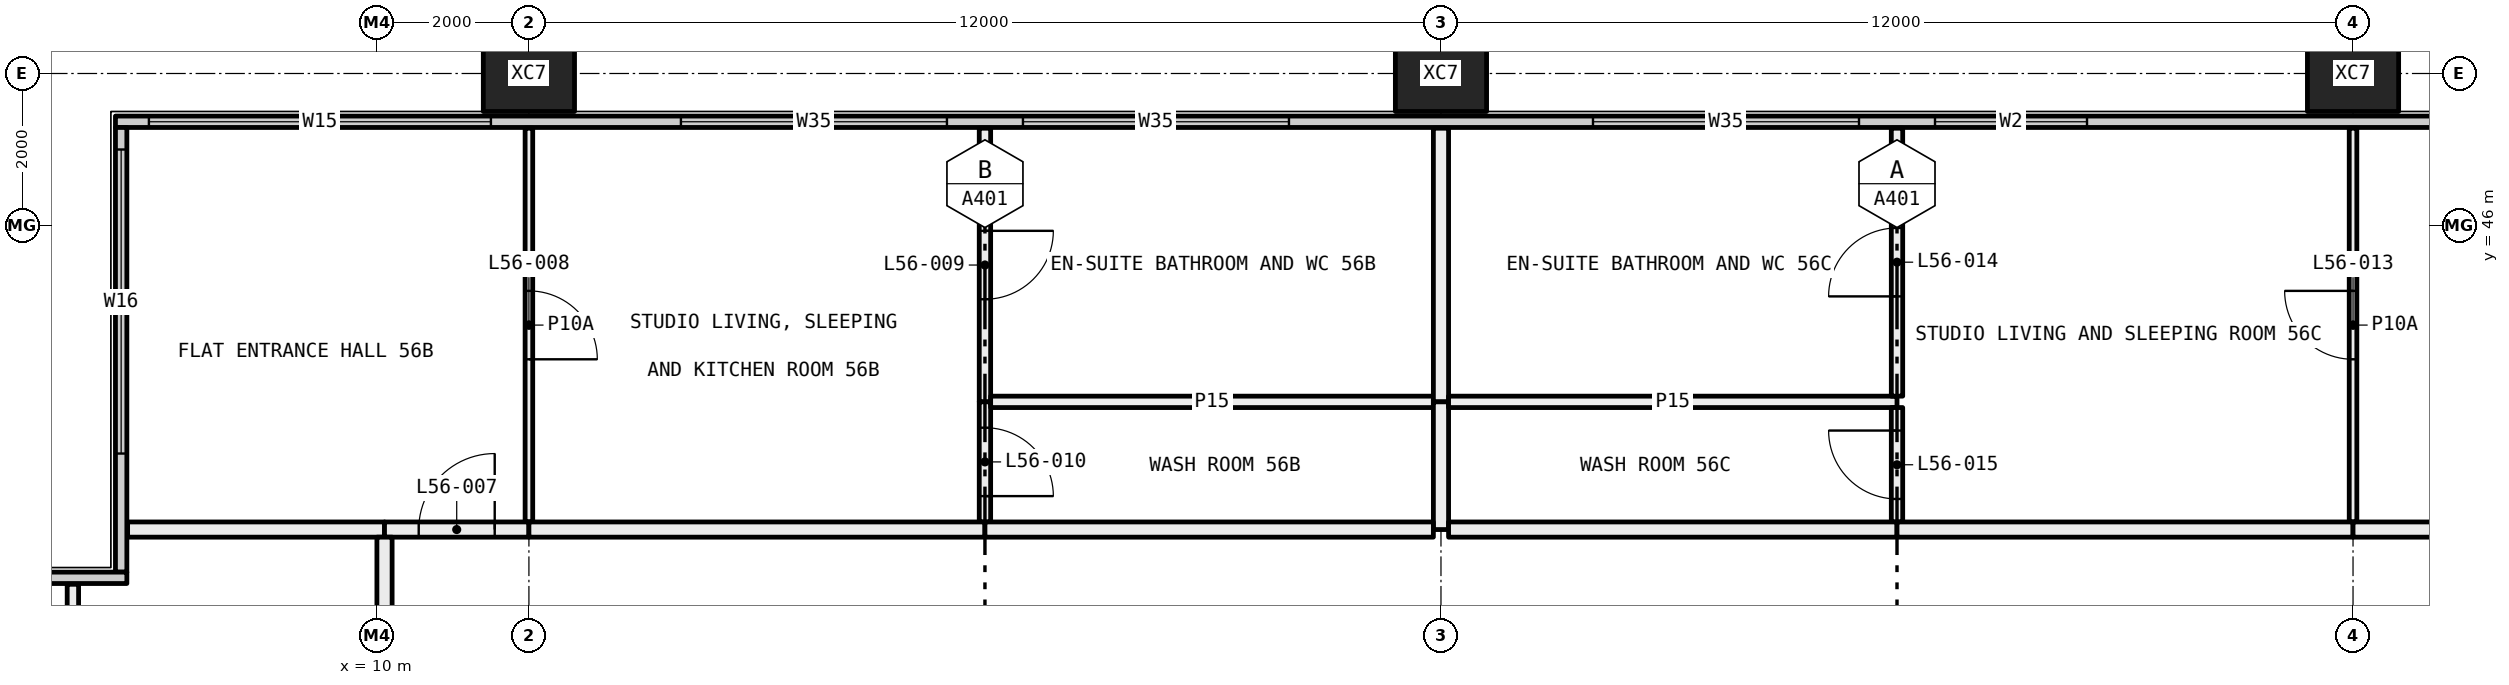
"""IFC4 building model, lengths in metres.
Left out: names, types, materials, properties, quantities, classifications, styles, units other than length and angle.
Written with IfcOpenShell. Run it as: python <this file> out.ifc"""

import sys

from ifc_helpers import new_model, si_unit, direction, frame, frame_2d, origin, origin_2d, place, context, subcontext, project, spatial, rectangle, hollow_rectangle, extrude, element, fill, save


model = new_model("IFC4")
c1 = context("Model", 3, precision=1e-05, world=origin(), true_north=direction((0.0, 1.0)))
c2 = subcontext(c1, "Body", "Model", "MODEL_VIEW")
j1 = project(units=[si_unit("LENGTHUNIT", "METRE"), si_unit("PLANEANGLEUNIT", "RADIAN")], contexts=[c1])
p1 = place(None, origin())
s1 = spatial("IfcSite", under=j1, at=p1, CompositionType="ELEMENT")
p2 = place(p1, origin())
s2 = spatial("IfcBuilding", under=s1, at=p2, CompositionType="ELEMENT")
p3 = place(p2, frame((0.0, 0.0, 210.0)))
s3 = spatial("IfcBuildingStorey", under=s2, at=p3, CompositionType="ELEMENT", Elevation=210.0)
for number, where, z_axis, x_axis in (
    (1, (12.0, 48.0, -0.4), (0.0, 0.0, 1.0), (1.0, 0.0, 0.0)),
    (2, (24.0, 48.0, -0.4), (0.0, 0.0, 1.0), (1.0, 0.0, 0.0)),
    (3, (36.0, 48.0, -0.4), (0.0, 0.0, 1.0), (1.0, 0.0, 0.0)),
):
    element("IfcColumn", number, at=place(p3, frame(where, z_axis=z_axis, x_axis=x_axis)), inside=s3, PredefinedType="COLUMN", context=c2, shape_type="SweptSolid", body=[
        extrude(hollow_rectangle(XDim=1.2, YDim=1.0, WallThickness=0.045, at=origin_2d()), origin(), (0.0, 0.0, 1.0), 3.45),
    ])
p4 = place(p3, frame((6.56, 47.365, 0.0), z_axis=(0.0, 0.0, 1.0), x_axis=(1.0, 0.0, 0.0)))
e4 = element("IfcWall", 4, at=p4, inside=s3, PredefinedType="ELEMENTEDWALL", context=c2, shape_type="SweptSolid", body=[
    extrude(rectangle(XDim=46.88, YDim=0.15, at=frame_2d((23.44, 0.0))), origin(), (0.0, 0.0, 1.0), 3.05),
])
p5 = place(p4, frame((0.44, 0.0, 0.45)))
e5 = element("IfcOpeningElement", 5, at=p5, cuts=e4, PredefinedType="OPENING", context=c2, shape_type="SweptSolid", body=[
    extrude(rectangle(XDim=4.5, YDim=2.55, at=frame_2d((2.25, 1.275))), frame((0.0, 0.085, 0.0), z_axis=(0.0, -1.0, 0.0), x_axis=(1.0, 0.0, 0.0)), (0.0, 0.0, 1.0), 0.17),
])
p6 = place(p4, frame((7.44, 0.0, 0.45)))
e6 = element("IfcOpeningElement", 6, at=p6, cuts=e4, PredefinedType="OPENING", context=c2, shape_type="SweptSolid", body=[
    extrude(rectangle(XDim=3.5, YDim=2.55, at=frame_2d((1.75, 1.275))), frame((0.0, 0.085, 0.0), z_axis=(0.0, -1.0, 0.0), x_axis=(1.0, 0.0, 0.0)), (0.0, 0.0, 1.0), 0.17),
])
p7 = place(p4, frame((11.94, 0.0, 0.45)))
e7 = element("IfcOpeningElement", 7, at=p7, cuts=e4, PredefinedType="OPENING", context=c2, shape_type="SweptSolid", body=[
    extrude(rectangle(XDim=3.5, YDim=2.55, at=frame_2d((1.75, 1.275))), frame((0.0, 0.085, 0.0), z_axis=(0.0, -1.0, 0.0), x_axis=(1.0, 0.0, 0.0)), (0.0, 0.0, 1.0), 0.17),
])
p8 = place(p4, frame((19.44, 0.0, 0.45)))
e8 = element("IfcOpeningElement", 8, at=p8, cuts=e4, PredefinedType="OPENING", context=c2, shape_type="SweptSolid", body=[
    extrude(rectangle(XDim=3.5, YDim=2.55, at=frame_2d((1.75, 1.275))), frame((0.0, 0.085, 0.0), z_axis=(0.0, -1.0, 0.0), x_axis=(1.0, 0.0, 0.0)), (0.0, 0.0, 1.0), 0.17),
])
p9 = place(p4, frame((23.94, 0.0, 0.45)))
e9 = element("IfcOpeningElement", 9, at=p9, cuts=e4, PredefinedType="OPENING", context=c2, shape_type="SweptSolid", body=[
    extrude(rectangle(XDim=2.0, YDim=2.55, at=frame_2d((1.0, 1.275))), frame((0.0, 0.085, 0.0), z_axis=(0.0, -1.0, 0.0), x_axis=(1.0, 0.0, 0.0)), (0.0, 0.0, 1.0), 0.17),
])
p10 = place(p4, frame((31.44, 0.0, 0.45)))
e10 = element("IfcOpeningElement", 10, at=p10, cuts=e4, PredefinedType="OPENING", context=c2, shape_type="SweptSolid", body=[
    extrude(rectangle(XDim=3.5, YDim=2.55, at=frame_2d((1.75, 1.275))), frame((0.0, 0.085, 0.0), z_axis=(0.0, -1.0, 0.0), x_axis=(1.0, 0.0, 0.0)), (0.0, 0.0, 1.0), 0.17),
])
p11 = place(p4, frame((35.94, 0.0, 0.45)))
e11 = element("IfcOpeningElement", 11, at=p11, cuts=e4, PredefinedType="OPENING", context=c2, shape_type="SweptSolid", body=[
    extrude(rectangle(XDim=3.5, YDim=2.55, at=frame_2d((1.75, 1.275))), frame((0.0, 0.085, 0.0), z_axis=(0.0, -1.0, 0.0), x_axis=(1.0, 0.0, 0.0)), (0.0, 0.0, 1.0), 0.17),
])
p12 = place(p4, frame((41.94, 0.0, 0.45)))
e12 = element("IfcOpeningElement", 12, at=p12, cuts=e4, PredefinedType="OPENING", context=c2, shape_type="SweptSolid", body=[
    extrude(rectangle(XDim=4.5, YDim=2.55, at=frame_2d((2.25, 1.275))), frame((0.0, 0.085, 0.0), z_axis=(0.0, -1.0, 0.0), x_axis=(1.0, 0.0, 0.0)), (0.0, 0.0, 1.0), 0.17),
])
p13 = place(p3, frame((6.635, 41.44, 0.0), z_axis=(0.0, 0.0, 1.0), x_axis=(0.0, 1.0, 0.0)))
e13 = element("IfcWall", 13, at=p13, inside=s3, PredefinedType="ELEMENTEDWALL", context=c2, shape_type="SweptSolid", body=[
    extrude(rectangle(XDim=5.85, YDim=0.15, at=frame_2d((2.925, 0.0))), origin(), (0.0, 0.0, 1.0), 3.05),
])
p14 = place(p13, frame((1.56, 0.0, 0.45)))
e14 = element("IfcOpeningElement", 14, at=p14, cuts=e13, PredefinedType="OPENING", context=c2, shape_type="SweptSolid", body=[
    extrude(rectangle(XDim=4.0, YDim=2.55, at=frame_2d((2.0, 1.275))), frame((0.0, 0.085, 0.0), z_axis=(0.0, -1.0, 0.0), x_axis=(1.0, 0.0, 0.0)), (0.0, 0.0, 1.0), 0.17),
])
p15 = place(p3, frame((0.56, 41.365, 0.0), z_axis=(0.0, 0.0, 1.0), x_axis=(1.0, 0.0, 0.0)))
e15 = element("IfcWall", 15, at=p15, inside=s3, PredefinedType="ELEMENTEDWALL", context=c2, shape_type="SweptSolid", body=[
    extrude(rectangle(XDim=6.15, YDim=0.15, at=frame_2d((3.075, 0.0))), origin(), (0.0, 0.0, 1.0), 3.05),
])
p16 = place(p15, frame((0.44, 0.0, 0.45)))
e16 = element("IfcOpeningElement", 16, at=p16, cuts=e15, PredefinedType="OPENING", context=c2, shape_type="SweptSolid", body=[
    extrude(rectangle(XDim=4.0, YDim=2.55, at=frame_2d((2.0, 1.275))), frame((0.0, 0.085, 0.0), z_axis=(0.0, -1.0, 0.0), x_axis=(1.0, 0.0, 0.0)), (0.0, 0.0, 1.0), 0.17),
])
p17 = place(p3, frame((12.0, 42.1, 0.0), z_axis=(0.0, 0.0, 1.0), x_axis=(0.0, 1.0, 0.0)))
e17 = element("IfcWall", 17, at=p17, inside=s3, PredefinedType="PARTITIONING", context=c2, shape_type="SweptSolid", body=[
    extrude(rectangle(XDim=5.18, YDim=0.1, at=frame_2d((2.59, 0.0))), origin(), (0.0, 0.0, 1.0), 3.05),
])
p18 = place(p17, frame((2.14, 0.0, 0.0)))
e18 = element("IfcOpeningElement", 18, at=p18, cuts=e17, PredefinedType="OPENING", context=c2, shape_type="SweptSolid", body=[
    extrude(rectangle(XDim=0.9, YDim=2.1, at=frame_2d((0.45, 1.05))), frame((0.0, 0.06, 0.0), z_axis=(0.0, -1.0, 0.0), x_axis=(1.0, 0.0, 0.0)), (0.0, 0.0, 1.0), 0.12),
])
p19 = place(p3, frame((6.72, 42.0, 0.0), z_axis=(0.0, 0.0, 1.0), x_axis=(1.0, 0.0, 0.0)))
e19 = element("IfcWall", 19, at=p19, inside=s3, PredefinedType="PARTITIONING", context=c2, shape_type="SweptSolid", body=[
    extrude(rectangle(XDim=3.38, YDim=0.2, at=frame_2d((1.69, 0.0))), origin(), (0.0, 0.0, 1.0), 3.05),
])
p20 = place(p3, frame((10.1, 42.0, 0.0), z_axis=(0.0, 0.0, 1.0), x_axis=(1.0, 0.0, 0.0)))
e20 = element("IfcWall", 20, at=p20, inside=s3, PredefinedType="PARTITIONING", context=c2, shape_type="SweptSolid", body=[
    extrude(rectangle(XDim=1.9, YDim=0.2, at=frame_2d((0.95, 0.0))), origin(), (0.0, 0.0, 1.0), 3.05),
])
p21 = place(p20, frame((0.45, 0.0, 0.0)))
e21 = element("IfcOpeningElement", 21, at=p21, cuts=e20, PredefinedType="OPENING", context=c2, shape_type="SweptSolid", body=[
    extrude(rectangle(XDim=1.0, YDim=2.1, at=frame_2d((0.5, 1.05))), frame((0.0, 0.11, 0.0), z_axis=(0.0, -1.0, 0.0), x_axis=(1.0, 0.0, 0.0)), (0.0, 0.0, 1.0), 0.22),
])
p22 = place(p3, frame((18.0, 43.68, 0.0), z_axis=(0.0, 0.0, 1.0), x_axis=(0.0, 1.0, 0.0)))
e22 = element("IfcWall", 22, at=p22, inside=s3, PredefinedType="PARTITIONING", context=c2, shape_type="SweptSolid", body=[
    extrude(rectangle(XDim=3.6, YDim=0.15, at=frame_2d((1.8, 0.0))), origin(), (0.0, 0.0, 1.0), 3.05),
])
p23 = place(p22, frame((1.35, 0.0, 0.0)))
e23 = element("IfcOpeningElement", 23, at=p23, cuts=e22, PredefinedType="OPENING", context=c2, shape_type="SweptSolid", body=[
    extrude(rectangle(XDim=0.9, YDim=2.1, at=frame_2d((0.45, 1.05))), frame((0.0, 0.085, 0.0), z_axis=(0.0, -1.0, 0.0), x_axis=(1.0, 0.0, 0.0)), (0.0, 0.0, 1.0), 0.17),
])
p24 = place(p3, frame((18.0, 42.1, 0.0), z_axis=(0.0, 0.0, 1.0), x_axis=(0.0, 1.0, 0.0)))
e24 = element("IfcWall", 24, at=p24, inside=s3, PredefinedType="PARTITIONING", context=c2, shape_type="SweptSolid", body=[
    extrude(rectangle(XDim=1.58, YDim=0.15, at=frame_2d((0.79, 0.0))), origin(), (0.0, 0.0, 1.0), 3.05),
])
p25 = place(p24, frame((0.34, 0.0, 0.0)))
e25 = element("IfcOpeningElement", 25, at=p25, cuts=e24, PredefinedType="OPENING", context=c2, shape_type="SweptSolid", body=[
    extrude(rectangle(XDim=0.9, YDim=2.1, at=frame_2d((0.45, 1.05))), frame((0.0, 0.085, 0.0), z_axis=(0.0, -1.0, 0.0), x_axis=(1.0, 0.0, 0.0)), (0.0, 0.0, 1.0), 0.17),
])
p26 = place(p3, frame((12.0, 42.0, 0.0), z_axis=(0.0, 0.0, 1.0), x_axis=(1.0, 0.0, 0.0)))
e26 = element("IfcWall", 26, at=p26, inside=s3, PredefinedType="PARTITIONING", context=c2, shape_type="SweptSolid", body=[
    extrude(rectangle(XDim=6.0, YDim=0.2, at=frame_2d((3.0, 0.0))), origin(), (0.0, 0.0, 1.0), 3.05),
])
p27 = place(p3, frame((18.075, 43.68, 0.0), z_axis=(0.0, 0.0, 1.0), x_axis=(1.0, 0.0, 0.0)))
e27 = element("IfcWall", 27, at=p27, inside=s3, PredefinedType="PARTITIONING", context=c2, shape_type="SweptSolid", body=[
    extrude(rectangle(XDim=5.825, YDim=0.15, at=frame_2d((2.913, 0.0))), origin(), (0.0, 0.0, 1.0), 3.05),
])
p28 = place(p3, frame((24.0, 43.68, 0.0), z_axis=(0.0, 0.0, 1.0), x_axis=(0.0, 1.0, 0.0)))
e28 = element("IfcWall", 28, at=p28, inside=s3, PredefinedType="PARTITIONING", context=c2, shape_type="SweptSolid", body=[
    extrude(rectangle(XDim=3.6, YDim=0.2, at=frame_2d((1.8, 0.0))), origin(), (0.0, 0.0, 1.0), 3.05),
])
p29 = place(p3, frame((24.0, 42.0, 0.0), z_axis=(0.0, 0.0, 1.0), x_axis=(0.0, 1.0, 0.0)))
e29 = element("IfcWall", 29, at=p29, inside=s3, PredefinedType="PARTITIONING", context=c2, shape_type="SweptSolid", body=[
    extrude(rectangle(XDim=1.68, YDim=0.2, at=frame_2d((0.84, 0.0))), origin(), (0.0, 0.0, 1.0), 3.05),
])
p30 = place(p3, frame((18.0, 42.0, 0.0), z_axis=(0.0, 0.0, 1.0), x_axis=(1.0, 0.0, 0.0)))
e30 = element("IfcWall", 30, at=p30, inside=s3, PredefinedType="PARTITIONING", context=c2, shape_type="SweptSolid", body=[
    extrude(rectangle(XDim=5.9, YDim=0.2, at=frame_2d((2.95, 0.0))), origin(), (0.0, 0.0, 1.0), 3.05),
])
p31 = place(p3, frame((24.1, 43.68, 0.0), z_axis=(0.0, 0.0, 1.0), x_axis=(1.0, 0.0, 0.0)))
e31 = element("IfcWall", 31, at=p31, inside=s3, PredefinedType="PARTITIONING", context=c2, shape_type="SweptSolid", body=[
    extrude(rectangle(XDim=5.9, YDim=0.15, at=frame_2d((2.95, 0.0))), origin(), (0.0, 0.0, 1.0), 3.05),
])
p32 = place(p3, frame((30.0, 43.755, 0.0), z_axis=(0.0, 0.0, 1.0), x_axis=(0.0, 1.0, 0.0)))
e32 = element("IfcWall", 32, at=p32, inside=s3, PredefinedType="PARTITIONING", context=c2, shape_type="SweptSolid", body=[
    extrude(rectangle(XDim=3.525, YDim=0.15, at=frame_2d((1.763, 0.0))), origin(), (0.0, 0.0, 1.0), 3.05),
])
p33 = place(p32, frame((1.312, 0.0, 0.0)))
e33 = element("IfcOpeningElement", 33, at=p33, cuts=e32, PredefinedType="OPENING", context=c2, shape_type="SweptSolid", body=[
    extrude(rectangle(XDim=0.9, YDim=2.1, at=frame_2d((0.45, 1.05))), frame((0.0, 0.085, 0.0), z_axis=(0.0, -1.0, 0.0), x_axis=(1.0, 0.0, 0.0)), (0.0, 0.0, 1.0), 0.17),
])
p34 = place(p3, frame((30.0, 42.1, 0.0), z_axis=(0.0, 0.0, 1.0), x_axis=(0.0, 1.0, 0.0)))
e34 = element("IfcWall", 34, at=p34, inside=s3, PredefinedType="PARTITIONING", context=c2, shape_type="SweptSolid", body=[
    extrude(rectangle(XDim=1.505, YDim=0.15, at=frame_2d((0.752, 0.0))), origin(), (0.0, 0.0, 1.0), 3.05),
])
p35 = place(p34, frame((0.302, 0.0, 0.0)))
e35 = element("IfcOpeningElement", 35, at=p35, cuts=e34, PredefinedType="OPENING", context=c2, shape_type="SweptSolid", body=[
    extrude(rectangle(XDim=0.9, YDim=2.1, at=frame_2d((0.45, 1.05))), frame((0.0, 0.085, 0.0), z_axis=(0.0, -1.0, 0.0), x_axis=(1.0, 0.0, 0.0)), (0.0, 0.0, 1.0), 0.17),
])
p36 = place(p3, frame((24.1, 42.0, 0.0), z_axis=(0.0, 0.0, 1.0), x_axis=(1.0, 0.0, 0.0)))
e36 = element("IfcWall", 36, at=p36, inside=s3, PredefinedType="PARTITIONING", context=c2, shape_type="SweptSolid", body=[
    extrude(rectangle(XDim=5.9, YDim=0.2, at=frame_2d((2.95, 0.0))), origin(), (0.0, 0.0, 1.0), 3.05),
])
p37 = place(p3, frame((36.0, 42.1, 0.0), z_axis=(0.0, 0.0, 1.0), x_axis=(0.0, 1.0, 0.0)))
e37 = element("IfcWall", 37, at=p37, inside=s3, PredefinedType="PARTITIONING", context=c2, shape_type="SweptSolid", body=[
    extrude(rectangle(XDim=5.18, YDim=0.1, at=frame_2d((2.59, 0.0))), origin(), (0.0, 0.0, 1.0), 2.45),
])
p38 = place(p37, frame((2.14, 0.0, 0.0)))
e38 = element("IfcOpeningElement", 38, at=p38, cuts=e37, PredefinedType="OPENING", context=c2, shape_type="SweptSolid", body=[
    extrude(rectangle(XDim=0.9, YDim=2.1, at=frame_2d((0.45, 1.05))), frame((0.0, 0.06, 0.0), z_axis=(0.0, -1.0, 0.0), x_axis=(1.0, 0.0, 0.0)), (0.0, 0.0, 1.0), 0.12),
])
for number, where, z_axis, x_axis in (
    (39, (30.0, 42.0, 0.0), (0.0, 0.0, 1.0), (1.0, 0.0, 0.0)),
    (40, (36.0, 42.0, 0.0), (0.0, 0.0, 1.0), (1.0, 0.0, 0.0)),
):
    element("IfcWall", number, at=place(p3, frame(where, z_axis=z_axis, x_axis=x_axis)), inside=s3, PredefinedType="PARTITIONING", context=c2, shape_type="SweptSolid", body=[
        extrude(rectangle(XDim=6.0, YDim=0.2, at=frame_2d((3.0, 0.0))), origin(), (0.0, 0.0, 1.0), 2.45),
    ])
p39 = place(p3, frame((6.0, 39.0, 0.0), z_axis=(0.0, 0.0, 1.0), x_axis=(0.0, 1.0, 0.0)))
e41 = element("IfcWall", 41, at=p39, inside=s3, PredefinedType="PARTITIONING", context=c2, shape_type="SweptSolid", body=[
    extrude(rectangle(XDim=2.28, YDim=0.15, at=frame_2d((1.14, 0.0))), origin(), (0.0, 0.0, 1.0), 3.05),
])
p40 = place(p3, frame((10.1, 39.0, 0.0), z_axis=(0.0, 0.0, 1.0), x_axis=(0.0, 1.0, 0.0)))
e42 = element("IfcWall", 42, at=p40, inside=s3, PredefinedType="PARTITIONING", context=c2, shape_type="SweptSolid", body=[
    extrude(rectangle(XDim=2.9, YDim=0.2, at=frame_2d((1.45, 0.0))), origin(), (0.0, 0.0, 1.0), 3.05),
])
p41 = place(p5, origin())
e43 = element("IfcWindow", 43, at=p41, inside=s3, PartitioningType="SINGLE_PANEL", PredefinedType="WINDOW", context=c2, shape_type="SweptSolid", body=[
    extrude(rectangle(XDim=4.5, YDim=2.55, at=frame_2d((2.25, 1.275))), frame((0.0, 0.03, 0.0), z_axis=(0.0, -1.0, 0.0), x_axis=(1.0, 0.0, 0.0)), (0.0, 0.0, 1.0), 0.06),
])
fill(e5, e43)
p42 = place(p6, origin())
e44 = element("IfcWindow", 44, at=p42, inside=s3, PartitioningType="SINGLE_PANEL", PredefinedType="WINDOW", context=c2, shape_type="SweptSolid", body=[
    extrude(rectangle(XDim=3.5, YDim=2.55, at=frame_2d((1.75, 1.275))), frame((0.0, 0.03, 0.0), z_axis=(0.0, -1.0, 0.0), x_axis=(1.0, 0.0, 0.0)), (0.0, 0.0, 1.0), 0.06),
])
fill(e6, e44)
p43 = place(p7, origin())
e45 = element("IfcWindow", 45, at=p43, inside=s3, PartitioningType="SINGLE_PANEL", PredefinedType="WINDOW", context=c2, shape_type="SweptSolid", body=[
    extrude(rectangle(XDim=3.5, YDim=2.55, at=frame_2d((1.75, 1.275))), frame((0.0, 0.03, 0.0), z_axis=(0.0, -1.0, 0.0), x_axis=(1.0, 0.0, 0.0)), (0.0, 0.0, 1.0), 0.06),
])
fill(e7, e45)
p44 = place(p8, origin())
e46 = element("IfcWindow", 46, at=p44, inside=s3, PartitioningType="SINGLE_PANEL", PredefinedType="WINDOW", context=c2, shape_type="SweptSolid", body=[
    extrude(rectangle(XDim=3.5, YDim=2.55, at=frame_2d((1.75, 1.275))), frame((0.0, 0.03, 0.0), z_axis=(0.0, -1.0, 0.0), x_axis=(1.0, 0.0, 0.0)), (0.0, 0.0, 1.0), 0.06),
])
fill(e8, e46)
p45 = place(p9, origin())
e47 = element("IfcWindow", 47, at=p45, inside=s3, PartitioningType="SINGLE_PANEL", PredefinedType="WINDOW", context=c2, shape_type="SweptSolid", body=[
    extrude(rectangle(XDim=2.0, YDim=2.55, at=frame_2d((1.0, 1.275))), frame((0.0, 0.03, 0.0), z_axis=(0.0, -1.0, 0.0), x_axis=(1.0, 0.0, 0.0)), (0.0, 0.0, 1.0), 0.06),
])
fill(e9, e47)
p46 = place(p14, origin())
e48 = element("IfcWindow", 48, at=p46, inside=s3, PartitioningType="SINGLE_PANEL", PredefinedType="WINDOW", context=c2, shape_type="SweptSolid", body=[
    extrude(rectangle(XDim=4.0, YDim=2.55, at=frame_2d((2.0, 1.275))), frame((0.0, 0.03, 0.0), z_axis=(0.0, -1.0, 0.0), x_axis=(1.0, 0.0, 0.0)), (0.0, 0.0, 1.0), 0.06),
])
fill(e14, e48)
p47 = place(p21, origin())
e49 = element("IfcDoor", 49, at=p47, inside=s3, OperationType="SINGLE_SWING_LEFT", PredefinedType="DOOR", context=c2, shape_type="SweptSolid", body=[
    extrude(rectangle(XDim=1.0, YDim=2.1, at=frame_2d((0.5, 1.05))), frame((0.0, 0.025, 0.0), z_axis=(0.0, -1.0, 0.0), x_axis=(1.0, 0.0, 0.0)), (0.0, 0.0, 1.0), 0.05),
])
fill(e21, e49)
p48 = place(p18, frame((0.9, 0.0, 0.0), x_axis=(-1.0, 0.0, 0.0)))
e50 = element("IfcDoor", 50, at=p48, inside=s3, OperationType="SINGLE_SWING_LEFT", PredefinedType="DOOR", context=c2, shape_type="SweptSolid", body=[
    extrude(rectangle(XDim=0.9, YDim=2.1, at=frame_2d((0.45, 1.05))), frame((0.0, 0.025, 0.0), z_axis=(0.0, -1.0, 0.0), x_axis=(1.0, 0.0, 0.0)), (0.0, 0.0, 1.0), 0.05),
])
fill(e18, e50)
p49 = place(p23, frame((0.9, 0.0, 0.0), x_axis=(-1.0, 0.0, 0.0)))
e51 = element("IfcDoor", 51, at=p49, inside=s3, OperationType="SINGLE_SWING_RIGHT", PredefinedType="DOOR", context=c2, shape_type="SweptSolid", body=[
    extrude(rectangle(XDim=0.9, YDim=2.1, at=frame_2d((0.45, 1.05))), frame((0.0, 0.025, 0.0), z_axis=(0.0, -1.0, 0.0), x_axis=(1.0, 0.0, 0.0)), (0.0, 0.0, 1.0), 0.05),
])
fill(e23, e51)
p50 = place(p25, frame((0.9, 0.0, 0.0), x_axis=(-1.0, 0.0, 0.0)))
e52 = element("IfcDoor", 52, at=p50, inside=s3, OperationType="SINGLE_SWING_LEFT", PredefinedType="DOOR", context=c2, shape_type="SweptSolid", body=[
    extrude(rectangle(XDim=0.9, YDim=2.1, at=frame_2d((0.45, 1.05))), frame((0.0, 0.025, 0.0), z_axis=(0.0, -1.0, 0.0), x_axis=(1.0, 0.0, 0.0)), (0.0, 0.0, 1.0), 0.05),
])
fill(e25, e52)
p51 = place(p38, origin())
e53 = element("IfcDoor", 53, at=p51, inside=s3, OperationType="SINGLE_SWING_LEFT", PredefinedType="DOOR", context=c2, shape_type="SweptSolid", body=[
    extrude(rectangle(XDim=0.9, YDim=2.1, at=frame_2d((0.45, 1.05))), frame((0.0, 0.025, 0.0), z_axis=(0.0, -1.0, 0.0), x_axis=(1.0, 0.0, 0.0)), (0.0, 0.0, 1.0), 0.05),
])
fill(e38, e53)
p52 = place(p33, origin())
e54 = element("IfcDoor", 54, at=p52, inside=s3, OperationType="SINGLE_SWING_RIGHT", PredefinedType="DOOR", context=c2, shape_type="SweptSolid", body=[
    extrude(rectangle(XDim=0.9, YDim=2.1, at=frame_2d((0.45, 1.05))), frame((0.0, 0.025, 0.0), z_axis=(0.0, -1.0, 0.0), x_axis=(1.0, 0.0, 0.0)), (0.0, 0.0, 1.0), 0.05),
])
fill(e33, e54)
p53 = place(p35, origin())
e55 = element("IfcDoor", 55, at=p53, inside=s3, OperationType="SINGLE_SWING_LEFT", PredefinedType="DOOR", context=c2, shape_type="SweptSolid", body=[
    extrude(rectangle(XDim=0.9, YDim=2.1, at=frame_2d((0.45, 1.05))), frame((0.0, 0.025, 0.0), z_axis=(0.0, -1.0, 0.0), x_axis=(1.0, 0.0, 0.0)), (0.0, 0.0, 1.0), 0.05),
])
fill(e35, e55)
save(model, sys.argv[1])
